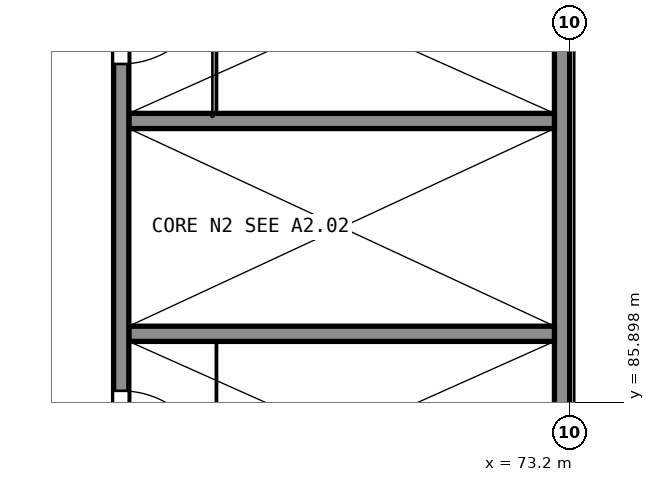
"""IFC4 building model, lengths in metres.
Left out: names, types, materials, properties, quantities, classifications, styles, units other than length and angle.
Written with IfcOpenShell. Run it as: python <this file> out.ifc"""

import sys

from ifc_helpers import new_model, si_unit, direction, frame, frame_2d, origin, place, context, subcontext, project, spatial, polyline, rectangle, outline, extrude, element, fill, save


model = new_model("IFC4")
c1 = context("Model", 3, precision=1e-05, world=origin(), true_north=direction((0.0, 1.0)))
c2 = subcontext(c1, "Body", "Model", "MODEL_VIEW")
j1 = project(units=[si_unit("LENGTHUNIT", "METRE"), si_unit("PLANEANGLEUNIT", "RADIAN")], contexts=[c1])
p1 = place(None, origin())
s1 = spatial("IfcSite", under=j1, at=p1, CompositionType="ELEMENT")
p2 = place(p1, origin())
s2 = spatial("IfcBuilding", under=s1, at=p2, CompositionType="ELEMENT")
p3 = place(p2, frame((0.0, 0.0, 20.0)))
s3 = spatial("IfcBuildingStorey", under=s2, at=p3, CompositionType="ELEMENT", Elevation=20.0)
p4 = place(p3, frame((73.1, 84.2, 0.0), z_axis=(0.0, 0.0, 1.0), x_axis=(0.0, 1.0, 0.0)))
e1 = element("IfcWall", 1, at=p4, inside=s3, PredefinedType="SHEAR", context=c2, shape_type="SweptSolid", body=[
    extrude(rectangle(XDim=8.0, YDim=0.2, at=frame_2d((4.0, 0.0))), origin(), (0.0, 0.0, 1.0), 10.4),
])
p5 = place(p3, frame((67.3, 84.2, 0.0), z_axis=(0.0, 0.0, 1.0), x_axis=(0.0, 1.0, 0.0)))
e2 = element("IfcWall", 2, at=p5, inside=s3, PredefinedType="SHEAR", context=c2, shape_type="SweptSolid", body=[
    extrude(outline(polyline([(0.0, 0.0), (8.0, 0.0), (8.0, 8.448), (7.704, 8.518), (7.407, 8.589), (7.111, 8.659), (6.815, 8.73), (6.519, 8.8), (6.222, 8.871), (5.926, 8.941), (5.333, 9.083), (5.037, 9.153), (4.741, 9.224), (4.444, 9.294), (4.148, 9.365), (3.852, 9.435), (3.556, 9.506), (3.259, 9.576), (2.963, 9.647), (2.667, 9.717), (2.074, 9.859), (1.778, 9.929), (1.481, 10.0), (1.185, 10.07), (0.889, 10.141), (0.593, 10.211), (0.296, 10.282), (0.0, 10.352), (0.0, 0.0)])), frame((0.0, 0.1, 0.0), z_axis=(0.0, -1.0, 0.0), x_axis=(1.0, 0.0, 0.0)), (0.0, 0.0, 1.0), 0.2),
])
p6 = place(p5, frame((0.65, 0.0, 0.0)))
e3 = element("IfcOpeningElement", 3, at=p6, cuts=e2, PredefinedType="OPENING", context=c2, shape_type="SweptSolid", body=[
    extrude(rectangle(XDim=1.2, YDim=2.1, at=frame_2d((0.6, 1.05))), frame((0.0, 0.11, 0.0), z_axis=(0.0, -1.0, 0.0), x_axis=(1.0, 0.0, 0.0)), (0.0, 0.0, 1.0), 0.22),
])
p7 = place(p5, frame((6.15, 0.0, 0.0)))
e4 = element("IfcOpeningElement", 4, at=p7, cuts=e2, PredefinedType="OPENING", context=c2, shape_type="SweptSolid", body=[
    extrude(rectangle(XDim=1.2, YDim=2.1, at=frame_2d((0.6, 1.05))), frame((0.0, 0.11, 0.0), z_axis=(0.0, -1.0, 0.0), x_axis=(1.0, 0.0, 0.0)), (0.0, 0.0, 1.0), 0.22),
])
p8 = place(p3, frame((67.4, 86.8, 0.0), z_axis=(0.0, 0.0, 1.0), x_axis=(1.0, 0.0, 0.0)))
e5 = element("IfcWall", 5, at=p8, inside=s3, PredefinedType="SHEAR", context=c2, shape_type="SweptSolid", body=[
    extrude(rectangle(XDim=5.6, YDim=0.2, at=frame_2d((2.8, 0.0))), origin(), (0.0, 0.0, 1.0), 9.732),
])
p9 = place(p3, frame((67.4, 89.6, 0.0), z_axis=(0.0, 0.0, 1.0), x_axis=(1.0, 0.0, 0.0)))
e6 = element("IfcWall", 6, at=p9, inside=s3, PredefinedType="SHEAR", context=c2, shape_type="SweptSolid", body=[
    extrude(rectangle(XDim=5.6, YDim=0.2, at=frame_2d((2.8, 0.0))), origin(), (0.0, 0.0, 1.0), 9.067),
])
p10 = place(p6, origin())
e7 = element("IfcDoor", 7, at=p10, inside=s3, OperationType="SINGLE_SWING_LEFT", PredefinedType="DOOR", context=c2, shape_type="SweptSolid", body=[
    extrude(rectangle(XDim=1.2, YDim=2.1, at=frame_2d((0.6, 1.05))), frame((0.0, 0.025, 0.0), z_axis=(0.0, -1.0, 0.0), x_axis=(1.0, 0.0, 0.0)), (0.0, 0.0, 1.0), 0.05),
])
fill(e3, e7)
p11 = place(p7, origin())
e8 = element("IfcDoor", 8, at=p11, inside=s3, OperationType="SINGLE_SWING_RIGHT", PredefinedType="DOOR", context=c2, shape_type="SweptSolid", body=[
    extrude(rectangle(XDim=1.2, YDim=2.1, at=frame_2d((0.6, 1.05))), frame((0.0, 0.025, 0.0), z_axis=(0.0, -1.0, 0.0), x_axis=(1.0, 0.0, 0.0)), (0.0, 0.0, 1.0), 0.05),
])
fill(e4, e8)
save(model, sys.argv[1])
